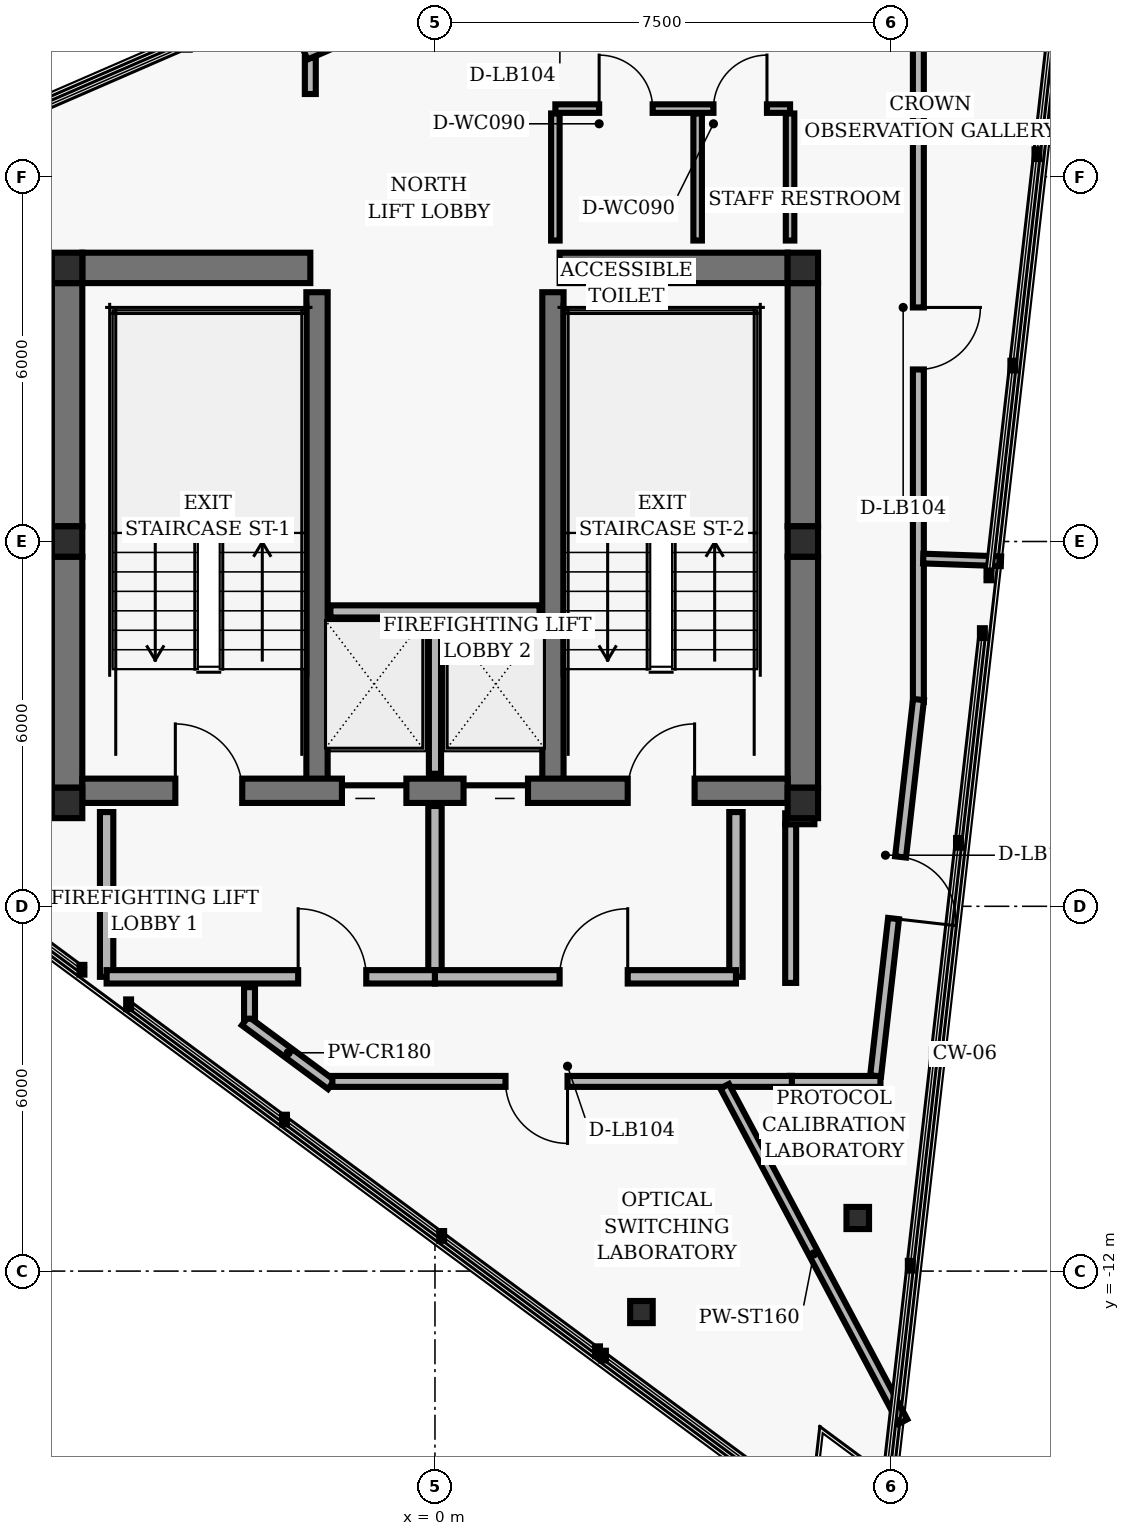
"""IFC4 building model, lengths in metres.
Left out: names, types, materials, properties, quantities, classifications, styles, units other than length and angle.
Written with IfcOpenShell. Run it as: python <this file> out.ifc"""

import sys

from ifc_helpers import new_model, si_unit, direction, frame, frame_2d, origin, origin_2d, place, context, subcontext, project, spatial, rectangle, hollow_rectangle, i_section, extrude, element, fill, save


model = new_model("IFC4")
c1 = context("Model", 3, precision=1e-05, world=origin(), true_north=direction((0.0, 1.0)))
c2 = subcontext(c1, "Body", "Model", "MODEL_VIEW")
j1 = project(units=[si_unit("LENGTHUNIT", "METRE"), si_unit("PLANEANGLEUNIT", "RADIAN")], contexts=[c1])
p1 = place(None, origin())
s1 = spatial("IfcSite", under=j1, at=p1, CompositionType="ELEMENT")
p2 = place(p1, origin())
s2 = spatial("IfcBuilding", under=s1, at=p2, CompositionType="ELEMENT")
p3 = place(p2, frame((0.0, 0.0, 252.0)))
s3 = spatial("IfcBuildingStorey", under=s2, at=p3, CompositionType="ELEMENT", Elevation=252.0)
for number, where, z_axis, x_axis in (
    (1, (-6.05, 4.5, 0.0), (0.0, 0.0, 1.0), (1.0, 0.0, 0.0)),
    (2, (6.05, 4.5, 0.0), (0.0, 0.0, 1.0), (1.0, 0.0, 0.0)),
    (3, (-6.05, 0.0, 0.0), (0.0, 0.0, 1.0), (1.0, 0.0, 0.0)),
    (4, (6.05, 0.0, 0.0), (0.0, 0.0, 1.0), (1.0, 0.0, 0.0)),
    (5, (-6.05, -4.3, 0.0), (0.0, 0.0, 1.0), (1.0, 0.0, 0.0)),
    (6, (6.05, -4.3, 0.0), (0.0, 0.0, 1.0), (1.0, 0.0, 0.0)),
):
    element("IfcColumn", number, at=place(p3, frame(where, z_axis=z_axis, x_axis=x_axis)), inside=s3, PredefinedType="COLUMN", context=c2, shape_type="SweptSolid", body=[
        extrude(hollow_rectangle(XDim=0.5, YDim=0.5, WallThickness=0.02, InnerFilletRadius=0.02, OuterFilletRadius=0.04, at=origin_2d()), origin(), (0.0, 0.0, 1.0), 2.88),
    ])
p4 = place(p3, frame((-6.05, 0.25, 0.0), z_axis=(0.0, 0.0, 1.0), x_axis=(0.0, 1.0, 0.0)))
e7 = element("IfcWall", 7, at=p4, inside=s3, PredefinedType="SHEAR", context=c2, shape_type="SweptSolid", body=[
    extrude(rectangle(XDim=4.0, YDim=0.5, at=frame_2d((2.0, 0.0))), origin(), (0.0, 0.0, 1.0), 2.648),
])
p5 = place(p3, frame((-6.05, -4.05, 0.0), z_axis=(0.0, 0.0, 1.0), x_axis=(0.0, 1.0, 0.0)))
e8 = element("IfcWall", 8, at=p5, inside=s3, PredefinedType="SHEAR", context=c2, shape_type="SweptSolid", body=[
    extrude(rectangle(XDim=3.8, YDim=0.5, at=frame_2d((1.9, 0.0))), origin(), (0.0, 0.0, 1.0), 2.648),
])
p6 = place(p3, frame((6.05, 0.25, 0.0), z_axis=(0.0, 0.0, 1.0), x_axis=(0.0, 1.0, 0.0)))
e9 = element("IfcWall", 9, at=p6, inside=s3, PredefinedType="SHEAR", context=c2, shape_type="SweptSolid", body=[
    extrude(rectangle(XDim=4.0, YDim=0.5, at=frame_2d((2.0, 0.0))), origin(), (0.0, 0.0, 1.0), 2.648),
])
p7 = place(p3, frame((6.05, -4.05, 0.0), z_axis=(0.0, 0.0, 1.0), x_axis=(0.0, 1.0, 0.0)))
e10 = element("IfcWall", 10, at=p7, inside=s3, PredefinedType="SHEAR", context=c2, shape_type="SweptSolid", body=[
    extrude(rectangle(XDim=3.8, YDim=0.5, at=frame_2d((1.9, 0.0))), origin(), (0.0, 0.0, 1.0), 2.648),
])
for number, where, z_axis, x_axis in (
    (11, (-1.94, -4.1, 0.0), (0.0, 0.0, 1.0), (0.0, 1.0, 0.0)),
    (12, (1.94, -4.1, 0.0), (0.0, 0.0, 1.0), (0.0, 1.0, 0.0)),
):
    element("IfcWall", number, at=place(p3, frame(where, z_axis=z_axis, x_axis=x_axis)), inside=s3, PredefinedType="SHEAR", context=c2, shape_type="SweptSolid", body=[
        extrude(rectangle(XDim=8.2, YDim=0.35, at=frame_2d((4.1, 0.0))), origin(), (0.0, 0.0, 1.0), 2.648),
    ])
p8 = place(p3, frame((-5.8, -4.1, 0.0), z_axis=(0.0, 0.0, 1.0), x_axis=(1.0, 0.0, 0.0)))
e13 = element("IfcWall", 13, at=p8, inside=s3, PredefinedType="SHEAR", context=c2, shape_type="SweptSolid", body=[
    extrude(rectangle(XDim=11.6, YDim=0.4, at=frame_2d((5.8, 0.0))), origin(), (0.0, 0.0, 1.0), 2.648),
])
p9 = place(p8, frame((1.53, 0.0, 0.0)))
e14 = element("IfcOpeningElement", 14, at=p9, cuts=e13, PredefinedType="OPENING", context=c2, shape_type="SweptSolid", body=[
    extrude(rectangle(XDim=1.1, YDim=2.04, at=frame_2d((0.55, 1.02))), frame((0.0, 0.21, 0.0), z_axis=(0.0, -1.0, 0.0), x_axis=(1.0, 0.0, 0.0)), (0.0, 0.0, 1.0), 0.42),
])
p10 = place(p8, frame((8.97, 0.0, 0.0)))
e15 = element("IfcOpeningElement", 15, at=p10, cuts=e13, PredefinedType="OPENING", context=c2, shape_type="SweptSolid", body=[
    extrude(rectangle(XDim=1.1, YDim=2.04, at=frame_2d((0.55, 1.02))), frame((0.0, 0.21, 0.0), z_axis=(0.0, -1.0, 0.0), x_axis=(1.0, 0.0, 0.0)), (0.0, 0.0, 1.0), 0.42),
])
p11 = place(p8, frame((4.27, 0.0, 0.0)))
e16 = element("IfcOpeningElement", 16, at=p11, cuts=e13, PredefinedType="OPENING", context=c2, shape_type="SweptSolid", body=[
    extrude(rectangle(XDim=1.06, YDim=2.04, at=frame_2d((0.53, 1.02))), frame((0.0, 0.21, 0.0), z_axis=(0.0, -1.0, 0.0), x_axis=(1.0, 0.0, 0.0)), (0.0, 0.0, 1.0), 0.42),
])
p12 = place(p8, frame((6.27, 0.0, 0.0)))
e17 = element("IfcOpeningElement", 17, at=p12, cuts=e13, PredefinedType="OPENING", context=c2, shape_type="SweptSolid", body=[
    extrude(rectangle(XDim=1.06, YDim=2.04, at=frame_2d((0.53, 1.02))), frame((0.0, 0.21, 0.0), z_axis=(0.0, -1.0, 0.0), x_axis=(1.0, 0.0, 0.0)), (0.0, 0.0, 1.0), 0.42),
])
for number, where, z_axis, x_axis in (
    (18, (-5.8, 4.5, 0.0), (0.0, 0.0, 1.0), (1.0, 0.0, 0.0)),
    (19, (2.05, 4.5, 0.0), (0.0, 0.0, 1.0), (1.0, 0.0, 0.0)),
):
    element("IfcWall", number, at=place(p3, frame(where, z_axis=z_axis, x_axis=x_axis)), inside=s3, PredefinedType="SHEAR", context=c2, shape_type="SweptSolid", body=[
        extrude(rectangle(XDim=3.75, YDim=0.5, at=frame_2d((1.875, 0.0))), origin(), (0.0, 0.0, 1.0), 2.648),
    ])
for number, where, z_axis, x_axis in (
    (20, (6.953, -11.127, 0.0), (0.0, 0.0, 1.0), (1.0, 0.0, 0.0)),
    (21, (3.396, -12.674, 0.0), (0.0, 0.0, 1.0), (1.0, 0.0, 0.0)),
):
    element("IfcColumn", number, at=place(p3, frame(where, z_axis=z_axis, x_axis=x_axis)), inside=s3, PredefinedType="COLUMN", context=c2, shape_type="SweptSolid", body=[
        extrude(i_section(OverallWidth=0.371, OverallDepth=0.364, WebThickness=0.013, FlangeThickness=0.022, FilletRadius=0.015, at=origin_2d()), origin(), (0.0, 0.0, 1.0), 2.88),
    ])
p13 = place(p3, frame((0.0, -3.82, 0.0), z_axis=(0.0, 0.0, 1.0), x_axis=(0.0, 1.0, 0.0)))
e22 = element("IfcWall", 22, at=p13, inside=s3, PredefinedType="PARTITIONING", context=c2, shape_type="SweptSolid", body=[
    extrude(rectangle(XDim=2.67, YDim=0.2, at=frame_2d((1.335, 0.0))), origin(), (0.0, 0.0, 1.0), 2.623),
])
p14 = place(p3, frame((-1.72, -1.15, 0.0), z_axis=(0.0, 0.0, 1.0), x_axis=(1.0, 0.0, 0.0)))
e23 = element("IfcWall", 23, at=p14, inside=s3, PredefinedType="PARTITIONING", context=c2, shape_type="SweptSolid", body=[
    extrude(rectangle(XDim=3.44, YDim=0.2, at=frame_2d((1.72, 0.0))), origin(), (0.0, 0.0, 1.0), 2.623),
])
for number, where, z_axis, x_axis in (
    (24, (-5.4, -7.16, 0.0), (0.0, 0.0, 1.0), (0.0, 1.0, 0.0)),
    (25, (4.95, -7.16, 0.0), (0.0, 0.0, 1.0), (0.0, 1.0, 0.0)),
):
    element("IfcWall", number, at=place(p3, frame(where, z_axis=z_axis, x_axis=x_axis)), inside=s3, PredefinedType="PARTITIONING", context=c2, shape_type="SweptSolid", body=[
        extrude(rectangle(XDim=2.71, YDim=0.22, at=frame_2d((1.355, 0.0))), origin(), (0.0, 0.0, 1.0), 2.623),
    ])
p15 = place(p3, frame((0.0, -7.16, 0.0), z_axis=(0.0, 0.0, 1.0), x_axis=(0.0, 1.0, 0.0)))
e26 = element("IfcWall", 26, at=p15, inside=s3, PredefinedType="PARTITIONING", context=c2, shape_type="SweptSolid", body=[
    extrude(rectangle(XDim=2.81, YDim=0.22, at=frame_2d((1.405, 0.0))), origin(), (0.0, 0.0, 1.0), 2.623),
])
p16 = place(p3, frame((-5.4, -7.16, 0.0), z_axis=(0.0, 0.0, 1.0), x_axis=(1.0, 0.0, 0.0)))
e27 = element("IfcWall", 27, at=p16, inside=s3, PredefinedType="PARTITIONING", context=c2, shape_type="SweptSolid", body=[
    extrude(rectangle(XDim=5.4, YDim=0.22, at=frame_2d((2.7, 0.0))), origin(), (0.0, 0.0, 1.0), 2.623),
])
p17 = place(p16, frame((3.15, 0.0, 0.0)))
e28 = element("IfcOpeningElement", 28, at=p17, cuts=e27, PredefinedType="OPENING", context=c2, shape_type="SweptSolid", body=[
    extrude(rectangle(XDim=1.12, YDim=2.02, at=frame_2d((0.56, 1.01))), frame((0.0, 0.12, 0.0), z_axis=(0.0, -1.0, 0.0), x_axis=(1.0, 0.0, 0.0)), (0.0, 0.0, 1.0), 0.24),
])
p18 = place(p3, frame((0.0, -7.16, 0.0), z_axis=(0.0, 0.0, 1.0), x_axis=(1.0, 0.0, 0.0)))
e29 = element("IfcWall", 29, at=p18, inside=s3, PredefinedType="PARTITIONING", context=c2, shape_type="SweptSolid", body=[
    extrude(rectangle(XDim=4.95, YDim=0.22, at=frame_2d((2.475, 0.0))), origin(), (0.0, 0.0, 1.0), 2.623),
])
p19 = place(p18, frame((2.05, 0.0, 0.0)))
e30 = element("IfcOpeningElement", 30, at=p19, cuts=e29, PredefinedType="OPENING", context=c2, shape_type="SweptSolid", body=[
    extrude(rectangle(XDim=1.12, YDim=2.02, at=frame_2d((0.56, 1.01))), frame((0.0, 0.12, 0.0), z_axis=(0.0, -1.0, 0.0), x_axis=(1.0, 0.0, 0.0)), (0.0, 0.0, 1.0), 0.24),
])
p20 = place(p3, frame((1.98, 4.95, 0.0), z_axis=(0.0, 0.0, 1.0), x_axis=(0.0, 1.0, 0.0)))
e31 = element("IfcWall", 31, at=p20, inside=s3, PredefinedType="PARTITIONING", context=c2, shape_type="SweptSolid", body=[
    extrude(rectangle(XDim=2.09, YDim=0.14, at=frame_2d((1.045, 0.0))), origin(), (0.0, 0.0, 1.0), 2.623),
])
p21 = place(p3, frame((5.84, 4.95, 0.0), z_axis=(0.0, 0.0, 1.0), x_axis=(0.0, 1.0, 0.0)))
e32 = element("IfcWall", 32, at=p21, inside=s3, PredefinedType="PARTITIONING", context=c2, shape_type="SweptSolid", body=[
    extrude(rectangle(XDim=2.09, YDim=0.14, at=frame_2d((1.045, 0.0))), origin(), (0.0, 0.0, 1.0), 2.153),
])
p22 = place(p3, frame((1.98, 7.12, 0.0), z_axis=(0.0, 0.0, 1.0), x_axis=(1.0, 0.0, 0.0)))
e33 = element("IfcWall", 33, at=p22, inside=s3, PredefinedType="PARTITIONING", context=c2, shape_type="SweptSolid", body=[
    extrude(rectangle(XDim=3.86, YDim=0.14, at=frame_2d((1.93, 0.0))), origin(), (0.0, 0.0, 1.0), 2.623),
])
p23 = place(p22, frame((0.72, 0.0, 0.0)))
e34 = element("IfcOpeningElement", 34, at=p23, cuts=e33, PredefinedType="OPENING", context=c2, shape_type="SweptSolid", body=[
    extrude(rectangle(XDim=0.88, YDim=2.02, at=frame_2d((0.44, 1.01))), frame((0.0, 0.08, 0.0), z_axis=(0.0, -1.0, 0.0), x_axis=(1.0, 0.0, 0.0)), (0.0, 0.0, 1.0), 0.16),
])
p24 = place(p22, frame((2.6, 0.0, 0.0)))
e35 = element("IfcOpeningElement", 35, at=p24, cuts=e33, PredefinedType="OPENING", context=c2, shape_type="SweptSolid", body=[
    extrude(rectangle(XDim=0.88, YDim=2.02, at=frame_2d((0.44, 1.01))), frame((0.0, 0.08, 0.0), z_axis=(0.0, -1.0, 0.0), x_axis=(1.0, 0.0, 0.0)), (0.0, 0.0, 1.0), 0.16),
])
p25 = place(p3, frame((4.32, 4.95, 0.0), z_axis=(0.0, 0.0, 1.0), x_axis=(0.0, 1.0, 0.0)))
e36 = element("IfcWall", 36, at=p25, inside=s3, PredefinedType="PARTITIONING", context=c2, shape_type="SweptSolid", body=[
    extrude(rectangle(XDim=2.09, YDim=0.14, at=frame_2d((1.045, 0.0))), origin(), (0.0, 0.0, 1.0), 2.623),
])
p26 = place(p3, frame((-1.705, -8.934, 0.0), z_axis=(0.0, 0.0, 1.0), x_axis=(-0.803804826616, 0.594893100236, 0.0)))
e37 = element("IfcWall", 37, at=p26, inside=s3, PredefinedType="PARTITIONING", context=c2, shape_type="SweptSolid", body=[
    extrude(rectangle(XDim=1.763, YDim=0.18, at=frame_2d((0.882, 0.0))), origin(), (0.0, 0.0, 1.0), 2.203),
])
p27 = place(p3, frame((-3.05, -7.848, 0.0), z_axis=(0.0, 0.0, 1.0), x_axis=(0.0, 1.0, 0.0)))
e38 = element("IfcWall", 38, at=p27, inside=s3, PredefinedType="PARTITIONING", context=c2, shape_type="SweptSolid", body=[
    extrude(rectangle(XDim=0.518, YDim=0.18, at=frame_2d((0.259, 0.0))), origin(), (0.0, 0.0, 1.0), 2.623),
])
p28 = place(p3, frame((5.85, -7.26, 0.0), z_axis=(0.0, 0.0, 1.0), x_axis=(0.0, 1.0, 0.0)))
e39 = element("IfcWall", 39, at=p28, inside=s3, PredefinedType="PARTITIONING", context=c2, shape_type="SweptSolid", body=[
    extrude(rectangle(XDim=2.61, YDim=0.18, at=frame_2d((1.305, 0.0))), origin(), (0.0, 0.0, 1.0), 2.153),
])
p29 = place(p3, frame((5.76, -4.56, 0.0), z_axis=(0.0, 0.0, 1.0), x_axis=(1.0, 0.0, 0.0)))
e40 = element("IfcWall", 40, at=p29, inside=s3, PredefinedType="PARTITIONING", context=c2, shape_type="SweptSolid", body=[
    extrude(rectangle(XDim=0.48, YDim=0.18, at=frame_2d((0.24, 0.0))), origin(), (0.0, 0.0, 1.0), 2.623),
])
p30 = place(p3, frame((-2.05, 7.36, 0.0), z_axis=(0.0, 0.0, 1.0), x_axis=(0.0, 1.0, 0.0)))
e41 = element("IfcWall", 41, at=p30, inside=s3, PredefinedType="PARTITIONING", context=c2, shape_type="SweptSolid", body=[
    extrude(rectangle(XDim=0.595, YDim=0.18, at=frame_2d((0.297, 0.0))), origin(), (0.0, 0.0, 1.0), 2.623),
])
p31 = place(p3, frame((-2.133, 8.009, 0.0), z_axis=(0.0, 0.0, 1.0), x_axis=(0.917070056253, 0.398726111414, 0.0)))
e42 = element("IfcWall", 42, at=p31, inside=s3, PredefinedType="PARTITIONING", context=c2, shape_type="SweptSolid", body=[
    extrude(rectangle(XDim=1.702, YDim=0.18, at=frame_2d((0.851, 0.0))), origin(), (0.0, 0.0, 1.0), 2.203),
])
p32 = place(p3, frame((7.95, 8.59, 0.0), z_axis=(0.0, 0.0, 1.0), x_axis=(0.0, -1.0, 0.0)))
e43 = element("IfcWall", 43, at=p32, inside=s3, PredefinedType="PARTITIONING", context=c2, shape_type="SweptSolid", body=[
    extrude(rectangle(XDim=1.41, YDim=0.18, at=frame_2d((0.705, 0.0))), origin(), (0.0, 0.0, 1.0), 2.623),
])
p33 = place(p3, frame((7.95, 7.22, 0.0), z_axis=(0.0, 0.0, 1.0), x_axis=(0.0, -1.0, 0.0)))
e44 = element("IfcWall", 44, at=p33, inside=s3, PredefinedType="PARTITIONING", context=c2, shape_type="SweptSolid", body=[
    extrude(rectangle(XDim=9.859, YDim=0.18, at=frame_2d((4.929, 0.0))), origin(), (0.0, 0.0, 1.0), 2.203),
])
p34 = place(p33, frame((3.371, 0.0, 0.0)))
e45 = element("IfcOpeningElement", 45, at=p34, cuts=e44, PredefinedType="OPENING", context=c2, shape_type="SweptSolid", body=[
    extrude(rectangle(XDim=1.02, YDim=2.02, at=frame_2d((0.51, 1.01))), frame((0.0, 0.1, 0.0), z_axis=(0.0, -1.0, 0.0), x_axis=(1.0, 0.0, 0.0)), (0.0, 0.0, 1.0), 0.2),
])
p35 = place(p3, frame((7.952, -2.599, 0.0), z_axis=(0.0, 0.0, 1.0), x_axis=(-0.113221740547, -0.993569744642, 0.0)))
e46 = element("IfcWall", 46, at=p35, inside=s3, PredefinedType="PARTITIONING", context=c2, shape_type="SweptSolid", body=[
    extrude(rectangle(XDim=6.232, YDim=0.18, at=frame_2d((3.116, 0.0))), origin(), (0.0, 0.0, 1.0), 2.203),
])
p36 = place(p35, frame((2.606, 0.0, 0.0)))
e47 = element("IfcOpeningElement", 47, at=p36, cuts=e46, PredefinedType="OPENING", context=c2, shape_type="SweptSolid", body=[
    extrude(rectangle(XDim=1.02, YDim=2.02, at=frame_2d((0.51, 1.01))), frame((0.0, 0.1, 0.0), z_axis=(0.0, -1.0, 0.0), x_axis=(1.0, 0.0, 0.0)), (0.0, 0.0, 1.0), 0.2),
])
p37 = place(p3, frame((7.327, -8.88, 0.0), z_axis=(0.0, 0.0, 1.0), x_axis=(-1.0, 0.0, 0.0)))
e48 = element("IfcWall", 48, at=p37, inside=s3, PredefinedType="PARTITIONING", context=c2, shape_type="SweptSolid", body=[
    extrude(rectangle(XDim=1.497, YDim=0.18, at=frame_2d((0.748, 0.0))), origin(), (0.0, 0.0, 1.0), 2.623),
])
p38 = place(p3, frame((5.87, -8.88, 0.0), z_axis=(0.0, 0.0, 1.0), x_axis=(-1.0, 0.0, 0.0)))
e49 = element("IfcWall", 49, at=p38, inside=s3, PredefinedType="PARTITIONING", context=c2, shape_type="SweptSolid", body=[
    extrude(rectangle(XDim=7.557, YDim=0.18, at=frame_2d((3.779, 0.0))), origin(), (0.0, 0.0, 1.0), 2.623),
])
p39 = place(p38, frame((3.69, 0.0, 0.0)))
e50 = element("IfcOpeningElement", 50, at=p39, cuts=e49, PredefinedType="OPENING", context=c2, shape_type="SweptSolid", body=[
    extrude(rectangle(XDim=1.02, YDim=2.02, at=frame_2d((0.51, 1.01))), frame((0.0, 0.1, 0.0), z_axis=(0.0, -1.0, 0.0), x_axis=(1.0, 0.0, 0.0)), (0.0, 0.0, 1.0), 0.2),
])
p40 = place(p3, frame((4.764, -8.96, 0.0), z_axis=(0.0, 0.0, 1.0), x_axis=(0.469463863752, -0.882951686465, 0.0)))
e51 = element("IfcWall", 51, at=p40, inside=s3, PredefinedType="PARTITIONING", context=c2, shape_type="SweptSolid", body=[
    extrude(rectangle(XDim=6.246, YDim=0.16, at=frame_2d((3.123, 0.0))), origin(), (0.0, 0.0, 1.0), 2.623),
])
p41 = place(p3, frame((8.03, -0.281, 0.0), z_axis=(0.0, 0.0, 1.0), x_axis=(0.999389795714, -0.034929016924, 0.0)))
e52 = element("IfcWall", 52, at=p41, inside=s3, PredefinedType="PARTITIONING", context=c2, shape_type="SweptSolid", body=[
    extrude(rectangle(XDim=1.279, YDim=0.16, at=frame_2d((0.64, 0.0))), origin(), (0.0, 0.0, 1.0), 2.623),
])
p42 = place(p9, origin())
e53 = element("IfcDoor", 53, at=p42, inside=s3, OperationType="SINGLE_SWING_LEFT", PredefinedType="DOOR", context=c2, shape_type="SweptSolid", body=[
    extrude(rectangle(XDim=1.1, YDim=2.04, at=frame_2d((0.55, 1.02))), frame((0.0, 0.025, 0.0), z_axis=(0.0, -1.0, 0.0), x_axis=(1.0, 0.0, 0.0)), (0.0, 0.0, 1.0), 0.05),
])
fill(e14, e53)
p43 = place(p10, origin())
e54 = element("IfcDoor", 54, at=p43, inside=s3, OperationType="SINGLE_SWING_RIGHT", PredefinedType="DOOR", context=c2, shape_type="SweptSolid", body=[
    extrude(rectangle(XDim=1.1, YDim=2.04, at=frame_2d((0.55, 1.02))), frame((0.0, 0.025, 0.0), z_axis=(0.0, -1.0, 0.0), x_axis=(1.0, 0.0, 0.0)), (0.0, 0.0, 1.0), 0.05),
])
fill(e15, e54)
p44 = place(p11, origin())
e55 = element("IfcDoor", 55, at=p44, inside=s3, OperationType="SLIDING_TO_LEFT", PredefinedType="DOOR", context=c2, shape_type="SweptSolid", body=[
    extrude(rectangle(XDim=1.06, YDim=2.04, at=frame_2d((0.53, 1.02))), frame((0.0, 0.025, 0.0), z_axis=(0.0, -1.0, 0.0), x_axis=(1.0, 0.0, 0.0)), (0.0, 0.0, 1.0), 0.05),
])
fill(e16, e55)
p45 = place(p12, origin())
e56 = element("IfcDoor", 56, at=p45, inside=s3, OperationType="SLIDING_TO_RIGHT", PredefinedType="DOOR", context=c2, shape_type="SweptSolid", body=[
    extrude(rectangle(XDim=1.06, YDim=2.04, at=frame_2d((0.53, 1.02))), frame((0.0, 0.025, 0.0), z_axis=(0.0, -1.0, 0.0), x_axis=(1.0, 0.0, 0.0)), (0.0, 0.0, 1.0), 0.05),
])
fill(e17, e56)
p46 = place(p17, origin())
e57 = element("IfcDoor", 57, at=p46, inside=s3, OperationType="SINGLE_SWING_LEFT", PredefinedType="DOOR", context=c2, shape_type="SweptSolid", body=[
    extrude(rectangle(XDim=1.12, YDim=2.02, at=frame_2d((0.56, 1.01))), frame((0.0, 0.025, 0.0), z_axis=(0.0, -1.0, 0.0), x_axis=(1.0, 0.0, 0.0)), (0.0, 0.0, 1.0), 0.05),
])
fill(e28, e57)
p47 = place(p19, origin())
e58 = element("IfcDoor", 58, at=p47, inside=s3, OperationType="SINGLE_SWING_RIGHT", PredefinedType="DOOR", context=c2, shape_type="SweptSolid", body=[
    extrude(rectangle(XDim=1.12, YDim=2.02, at=frame_2d((0.56, 1.01))), frame((0.0, 0.025, 0.0), z_axis=(0.0, -1.0, 0.0), x_axis=(1.0, 0.0, 0.0)), (0.0, 0.0, 1.0), 0.05),
])
fill(e30, e58)
p48 = place(p23, origin())
e59 = element("IfcDoor", 59, at=p48, inside=s3, OperationType="SINGLE_SWING_LEFT", PredefinedType="DOOR", context=c2, shape_type="SweptSolid", body=[
    extrude(rectangle(XDim=0.88, YDim=2.02, at=frame_2d((0.44, 1.01))), frame((0.0, 0.025, 0.0), z_axis=(0.0, -1.0, 0.0), x_axis=(1.0, 0.0, 0.0)), (0.0, 0.0, 1.0), 0.05),
])
fill(e34, e59)
p49 = place(p24, origin())
e60 = element("IfcDoor", 60, at=p49, inside=s3, OperationType="SINGLE_SWING_RIGHT", PredefinedType="DOOR", context=c2, shape_type="SweptSolid", body=[
    extrude(rectangle(XDim=0.88, YDim=2.02, at=frame_2d((0.44, 1.01))), frame((0.0, 0.025, 0.0), z_axis=(0.0, -1.0, 0.0), x_axis=(1.0, 0.0, 0.0)), (0.0, 0.0, 1.0), 0.05),
])
fill(e35, e60)
p50 = place(p39, origin())
e61 = element("IfcDoor", 61, at=p50, inside=s3, OperationType="SINGLE_SWING_LEFT", PredefinedType="DOOR", context=c2, shape_type="SweptSolid", body=[
    extrude(rectangle(XDim=1.02, YDim=2.02, at=frame_2d((0.51, 1.01))), frame((0.0, 0.025, 0.0), z_axis=(0.0, -1.0, 0.0), x_axis=(1.0, 0.0, 0.0)), (0.0, 0.0, 1.0), 0.05),
])
fill(e50, e61)
p51 = place(p36, origin())
e62 = element("IfcDoor", 62, at=p51, inside=s3, OperationType="SINGLE_SWING_RIGHT", PredefinedType="DOOR", context=c2, shape_type="SweptSolid", body=[
    extrude(rectangle(XDim=1.02, YDim=2.02, at=frame_2d((0.51, 1.01))), frame((0.0, 0.025, 0.0), z_axis=(0.0, -1.0, 0.0), x_axis=(1.0, 0.0, 0.0)), (0.0, 0.0, 1.0), 0.05),
])
fill(e47, e62)
p52 = place(p34, origin())
e63 = element("IfcDoor", 63, at=p52, inside=s3, OperationType="SINGLE_SWING_LEFT", PredefinedType="DOOR", context=c2, shape_type="SweptSolid", body=[
    extrude(rectangle(XDim=1.02, YDim=2.02, at=frame_2d((0.51, 1.01))), frame((0.0, 0.025, 0.0), z_axis=(0.0, -1.0, 0.0), x_axis=(1.0, 0.0, 0.0)), (0.0, 0.0, 1.0), 0.05),
])
fill(e45, e63)
save(model, sys.argv[1])
